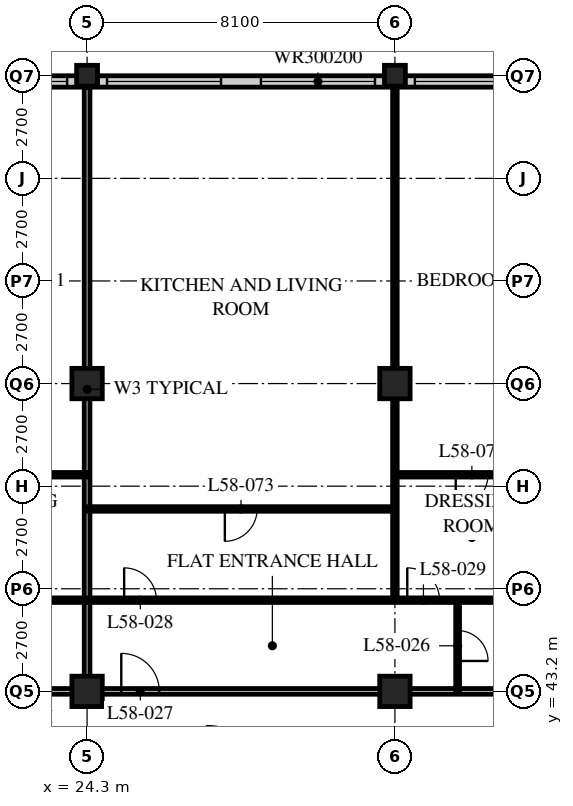
"""IFC4 building model, lengths in metres.
Left out: names, types, materials, properties, quantities, classifications, styles, units other than length and angle.
Written with IfcOpenShell. Run it as: python <this file> out.ifc"""

import sys

from ifc_helpers import new_model, si_unit, direction, frame, frame_2d, origin, origin_2d, place, context, subcontext, project, spatial, rectangle, hollow_rectangle, extrude, element, fill, save


model = new_model("IFC4")
c1 = context("Model", 3, precision=1e-05, world=origin(), true_north=direction((0.0, 1.0)))
c2 = subcontext(c1, "Body", "Model", "MODEL_VIEW")
j1 = project(units=[si_unit("LENGTHUNIT", "METRE"), si_unit("PLANEANGLEUNIT", "RADIAN")], contexts=[c1])
p1 = place(None, origin())
s1 = spatial("IfcSite", under=j1, at=p1, CompositionType="ELEMENT")
p2 = place(p1, origin())
s2 = spatial("IfcBuilding", under=s1, at=p2, CompositionType="ELEMENT")
p3 = place(p2, frame((0.0, 0.0, 224.4)))
s3 = spatial("IfcBuildingStorey", under=s2, at=p3, CompositionType="ELEMENT", Elevation=224.4)
for number, where, z_axis, x_axis in (
    (1, (24.3, 43.2, 0.0), (0.0, 0.0, 1.0), (1.0, 0.0, 0.0)),
    (2, (24.3, 51.3, 0.0), (0.0, 0.0, 1.0), (1.0, 0.0, 0.0)),
):
    element("IfcColumn", number, at=place(p3, frame(where, z_axis=z_axis, x_axis=x_axis)), inside=s3, PredefinedType="COLUMN", context=c2, shape_type="SweptSolid", body=[
        extrude(hollow_rectangle(XDim=0.8, YDim=0.8, WallThickness=0.08, at=origin_2d()), origin(), (0.0, 0.0, 1.0), 3.6),
    ])
p4 = place(p3, frame((24.3, 59.4, 0.0), z_axis=(0.0, 0.0, 1.0), x_axis=(1.0, 0.0, 0.0)))
e3 = element("IfcColumn", 3, at=p4, inside=s3, PredefinedType="COLUMN", context=c2, shape_type="SweptSolid", body=[
    extrude(hollow_rectangle(XDim=0.55, YDim=0.55, WallThickness=0.045, at=origin_2d()), origin(), (0.0, 0.0, 1.0), 3.6),
])
for number, where, z_axis, x_axis in (
    (4, (32.4, 43.2, 0.0), (0.0, 0.0, 1.0), (1.0, 0.0, 0.0)),
    (5, (32.4, 51.3, 0.0), (0.0, 0.0, 1.0), (1.0, 0.0, 0.0)),
):
    element("IfcColumn", number, at=place(p3, frame(where, z_axis=z_axis, x_axis=x_axis)), inside=s3, PredefinedType="COLUMN", context=c2, shape_type="SweptSolid", body=[
        extrude(hollow_rectangle(XDim=0.8, YDim=0.8, WallThickness=0.08, at=origin_2d()), origin(), (0.0, 0.0, 1.0), 3.6),
    ])
p5 = place(p3, frame((32.4, 59.4, 0.0), z_axis=(0.0, 0.0, 1.0), x_axis=(1.0, 0.0, 0.0)))
e6 = element("IfcColumn", 6, at=p5, inside=s3, PredefinedType="COLUMN", context=c2, shape_type="SweptSolid", body=[
    extrude(hollow_rectangle(XDim=0.55, YDim=0.55, WallThickness=0.045, at=origin_2d()), origin(), (0.0, 0.0, 1.0), 3.6),
])
p6 = place(p3, frame((48.3, 59.25, 0.0), z_axis=(0.0, 0.0, 1.0), x_axis=(-1.0, 0.0, 0.0)))
e7 = element("IfcWall", 7, at=p6, inside=s3, PredefinedType="SOLIDWALL", context=c2, shape_type="SweptSolid", body=[
    extrude(rectangle(XDim=40.2, YDim=0.3, at=frame_2d((20.1, 0.0))), origin(), (0.0, 0.0, 1.0), 3.39),
])
p7 = place(p6, frame((0.225, 0.0, 0.6)))
e8 = element("IfcOpeningElement", 8, at=p7, cuts=e7, PredefinedType="OPENING", context=c2, shape_type="SweptSolid", body=[
    extrude(rectangle(XDim=3.0, YDim=2.0, at=frame_2d((1.5, 1.0))), frame((0.0, 0.16, 0.0), z_axis=(0.0, -1.0, 0.0), x_axis=(1.0, 0.0, 0.0)), (0.0, 0.0, 1.0), 0.32),
])
p8 = place(p6, frame((4.275, 0.0, 0.6)))
e9 = element("IfcOpeningElement", 9, at=p8, cuts=e7, PredefinedType="OPENING", context=c2, shape_type="SweptSolid", body=[
    extrude(rectangle(XDim=3.0, YDim=2.0, at=frame_2d((1.5, 1.0))), frame((0.0, 0.16, 0.0), z_axis=(0.0, -1.0, 0.0), x_axis=(1.0, 0.0, 0.0)), (0.0, 0.0, 1.0), 0.32),
])
p9 = place(p6, frame((8.325, 0.0, 0.6)))
e10 = element("IfcOpeningElement", 10, at=p9, cuts=e7, PredefinedType="OPENING", context=c2, shape_type="SweptSolid", body=[
    extrude(rectangle(XDim=3.0, YDim=2.0, at=frame_2d((1.5, 1.0))), frame((0.0, 0.16, 0.0), z_axis=(0.0, -1.0, 0.0), x_axis=(1.0, 0.0, 0.0)), (0.0, 0.0, 1.0), 0.32),
])
p10 = place(p6, frame((12.375, 0.0, 0.6)))
e11 = element("IfcOpeningElement", 11, at=p10, cuts=e7, PredefinedType="OPENING", context=c2, shape_type="SweptSolid", body=[
    extrude(rectangle(XDim=3.0, YDim=2.0, at=frame_2d((1.5, 1.0))), frame((0.0, 0.16, 0.0), z_axis=(0.0, -1.0, 0.0), x_axis=(1.0, 0.0, 0.0)), (0.0, 0.0, 1.0), 0.32),
])
p11 = place(p6, frame((16.425, 0.0, 0.6)))
e12 = element("IfcOpeningElement", 12, at=p11, cuts=e7, PredefinedType="OPENING", context=c2, shape_type="SweptSolid", body=[
    extrude(rectangle(XDim=3.0, YDim=2.0, at=frame_2d((1.5, 1.0))), frame((0.0, 0.16, 0.0), z_axis=(0.0, -1.0, 0.0), x_axis=(1.0, 0.0, 0.0)), (0.0, 0.0, 1.0), 0.32),
])
p12 = place(p6, frame((20.475, 0.0, 0.6)))
e13 = element("IfcOpeningElement", 13, at=p12, cuts=e7, PredefinedType="OPENING", context=c2, shape_type="SweptSolid", body=[
    extrude(rectangle(XDim=3.0, YDim=2.0, at=frame_2d((1.5, 1.0))), frame((0.0, 0.16, 0.0), z_axis=(0.0, -1.0, 0.0), x_axis=(1.0, 0.0, 0.0)), (0.0, 0.0, 1.0), 0.32),
])
p13 = place(p6, frame((24.525, 0.0, 0.6)))
e14 = element("IfcOpeningElement", 14, at=p13, cuts=e7, PredefinedType="OPENING", context=c2, shape_type="SweptSolid", body=[
    extrude(rectangle(XDim=3.0, YDim=2.0, at=frame_2d((1.5, 1.0))), frame((0.0, 0.16, 0.0), z_axis=(0.0, -1.0, 0.0), x_axis=(1.0, 0.0, 0.0)), (0.0, 0.0, 1.0), 0.32),
])
p14 = place(p6, frame((28.575, 0.0, 0.6)))
e15 = element("IfcOpeningElement", 15, at=p14, cuts=e7, PredefinedType="OPENING", context=c2, shape_type="SweptSolid", body=[
    extrude(rectangle(XDim=3.0, YDim=2.0, at=frame_2d((1.5, 1.0))), frame((0.0, 0.16, 0.0), z_axis=(0.0, -1.0, 0.0), x_axis=(1.0, 0.0, 0.0)), (0.0, 0.0, 1.0), 0.32),
])
p15 = place(p6, frame((32.625, 0.0, 0.6)))
e16 = element("IfcOpeningElement", 16, at=p15, cuts=e7, PredefinedType="OPENING", context=c2, shape_type="SweptSolid", body=[
    extrude(rectangle(XDim=3.0, YDim=2.0, at=frame_2d((1.5, 1.0))), frame((0.0, 0.16, 0.0), z_axis=(0.0, -1.0, 0.0), x_axis=(1.0, 0.0, 0.0)), (0.0, 0.0, 1.0), 0.32),
])
p16 = place(p6, frame((36.675, 0.0, 0.6)))
e17 = element("IfcOpeningElement", 17, at=p16, cuts=e7, PredefinedType="OPENING", context=c2, shape_type="SweptSolid", body=[
    extrude(rectangle(XDim=3.0, YDim=2.0, at=frame_2d((1.5, 1.0))), frame((0.0, 0.16, 0.0), z_axis=(0.0, -1.0, 0.0), x_axis=(1.0, 0.0, 0.0)), (0.0, 0.0, 1.0), 0.32),
])
p17 = place(p3, frame((8.1, 43.2, 0.0), z_axis=(0.0, 0.0, 1.0), x_axis=(1.0, 0.0, 0.0)))
e18 = element("IfcWall", 18, at=p17, inside=s3, PredefinedType="PARTITIONING", context=c2, shape_type="SweptSolid", body=[
    extrude(rectangle(XDim=36.45, YDim=0.15, at=frame_2d((18.225, 0.0))), origin(), (0.0, 0.0, 1.0), 2.628),
])
p18 = place(p17, frame((4.45, 0.0, 0.0)))
e19 = element("IfcOpeningElement", 19, at=p18, cuts=e18, PredefinedType="OPENING", context=c2, shape_type="SweptSolid", body=[
    extrude(rectangle(XDim=1.0, YDim=2.1, at=frame_2d((0.5, 1.05))), frame((0.0, 0.085, 0.0), z_axis=(0.0, -1.0, 0.0), x_axis=(1.0, 0.0, 0.0)), (0.0, 0.0, 1.0), 0.17),
])
p19 = place(p17, frame((17.1, 0.0, 0.0)))
e20 = element("IfcOpeningElement", 20, at=p19, cuts=e18, PredefinedType="OPENING", context=c2, shape_type="SweptSolid", body=[
    extrude(rectangle(XDim=1.0, YDim=2.1, at=frame_2d((0.5, 1.05))), frame((0.0, 0.085, 0.0), z_axis=(0.0, -1.0, 0.0), x_axis=(1.0, 0.0, 0.0)), (0.0, 0.0, 1.0), 0.17),
])
p20 = place(p17, frame((29.05, 0.0, 0.0)))
e21 = element("IfcOpeningElement", 21, at=p20, cuts=e18, PredefinedType="OPENING", context=c2, shape_type="SweptSolid", body=[
    extrude(rectangle(XDim=1.0, YDim=2.1, at=frame_2d((0.5, 1.05))), frame((0.0, 0.085, 0.0), z_axis=(0.0, -1.0, 0.0), x_axis=(1.0, 0.0, 0.0)), (0.0, 0.0, 1.0), 0.17),
])
p21 = place(p17, frame((33.925, 0.0, 0.0)))
e22 = element("IfcOpeningElement", 22, at=p21, cuts=e18, PredefinedType="OPENING", context=c2, shape_type="SweptSolid", body=[
    extrude(rectangle(XDim=1.0, YDim=2.1, at=frame_2d((0.5, 1.05))), frame((0.0, 0.085, 0.0), z_axis=(0.0, -1.0, 0.0), x_axis=(1.0, 0.0, 0.0)), (0.0, 0.0, 1.0), 0.17),
])
p22 = place(p17, frame((1.525, 0.0, 0.0)))
e23 = element("IfcOpeningElement", 23, at=p22, cuts=e18, PredefinedType="OPENING", context=c2, shape_type="SweptSolid", body=[
    extrude(rectangle(XDim=1.0, YDim=2.1, at=frame_2d((0.5, 1.05))), frame((0.0, 0.085, 0.0), z_axis=(0.0, -1.0, 0.0), x_axis=(1.0, 0.0, 0.0)), (0.0, 0.0, 1.0), 0.17),
])
p23 = place(p3, frame((24.3, 43.2, 0.0), z_axis=(0.0, 0.0, 1.0), x_axis=(0.0, 1.0, 0.0)))
e24 = element("IfcWall", 24, at=p23, inside=s3, PredefinedType="PARTITIONING", context=c2, shape_type="SweptSolid", body=[
    extrude(rectangle(XDim=15.9, YDim=0.15, at=frame_2d((7.95, 0.0))), origin(), (0.0, 0.0, 1.0), 2.628),
])
p24 = place(p3, frame((34.05, 43.2, 0.0), z_axis=(0.0, 0.0, 1.0), x_axis=(0.0, 1.0, 0.0)))
e25 = element("IfcWall", 25, at=p24, inside=s3, PredefinedType="PARTITIONING", context=c2, shape_type="SweptSolid", body=[
    extrude(rectangle(XDim=2.4, YDim=0.1, at=frame_2d((1.2, 0.0))), origin(), (0.0, 0.0, 1.0), 3.39),
])
p25 = place(p24, frame((0.8, 0.0, 0.0)))
e26 = element("IfcOpeningElement", 26, at=p25, cuts=e25, PredefinedType="OPENING", context=c2, shape_type="SweptSolid", body=[
    extrude(rectangle(XDim=0.8, YDim=2.1, at=frame_2d((0.4, 1.05))), frame((0.0, 0.06, 0.0), z_axis=(0.0, -1.0, 0.0), x_axis=(1.0, 0.0, 0.0)), (0.0, 0.0, 1.0), 0.12),
])
p26 = place(p3, frame((32.4, 45.6, 0.0), z_axis=(0.0, 0.0, 1.0), x_axis=(0.0, 1.0, 0.0)))
e27 = element("IfcWall", 27, at=p26, inside=s3, PredefinedType="PARTITIONING", context=c2, shape_type="SweptSolid", body=[
    extrude(rectangle(XDim=13.5, YDim=0.12, at=frame_2d((6.75, 0.0))), origin(), (0.0, 0.0, 1.0), 2.628),
])
p27 = place(p3, frame((4.1, 45.6, 0.0), z_axis=(0.0, 0.0, 1.0), x_axis=(1.0, 0.0, 0.0)))
e28 = element("IfcWall", 28, at=p27, inside=s3, PredefinedType="PARTITIONING", context=c2, shape_type="SweptSolid", body=[
    extrude(rectangle(XDim=32.35, YDim=0.12, at=frame_2d((16.175, 0.0))), origin(), (0.0, 0.0, 1.0), 3.39),
])
p28 = place(p27, frame((9.025, 0.0, 0.0)))
e29 = element("IfcOpeningElement", 29, at=p28, cuts=e28, PredefinedType="OPENING", context=c2, shape_type="SweptSolid", body=[
    extrude(rectangle(XDim=0.85, YDim=2.1, at=frame_2d((0.425, 1.05))), frame((0.0, 0.07, 0.0), z_axis=(0.0, -1.0, 0.0), x_axis=(1.0, 0.0, 0.0)), (0.0, 0.0, 1.0), 0.14),
])
p29 = place(p27, frame((16.475, 0.0, 0.0)))
e30 = element("IfcOpeningElement", 30, at=p29, cuts=e28, PredefinedType="OPENING", context=c2, shape_type="SweptSolid", body=[
    extrude(rectangle(XDim=0.85, YDim=2.1, at=frame_2d((0.425, 1.05))), frame((0.0, 0.07, 0.0), z_axis=(0.0, -1.0, 0.0), x_axis=(1.0, 0.0, 0.0)), (0.0, 0.0, 1.0), 0.14),
])
p30 = place(p27, frame((21.175, 0.0, 0.0)))
e31 = element("IfcOpeningElement", 31, at=p30, cuts=e28, PredefinedType="OPENING", context=c2, shape_type="SweptSolid", body=[
    extrude(rectangle(XDim=0.85, YDim=2.1, at=frame_2d((0.425, 1.05))), frame((0.0, 0.07, 0.0), z_axis=(0.0, -1.0, 0.0), x_axis=(1.0, 0.0, 0.0)), (0.0, 0.0, 1.0), 0.14),
])
p31 = place(p27, frame((28.625, 0.0, 0.0)))
e32 = element("IfcOpeningElement", 32, at=p31, cuts=e28, PredefinedType="OPENING", context=c2, shape_type="SweptSolid", body=[
    extrude(rectangle(XDim=0.85, YDim=2.1, at=frame_2d((0.425, 1.05))), frame((0.0, 0.07, 0.0), z_axis=(0.0, -1.0, 0.0), x_axis=(1.0, 0.0, 0.0)), (0.0, 0.0, 1.0), 0.14),
])
p32 = place(p27, frame((6.725, 0.0, 0.0)))
e33 = element("IfcOpeningElement", 33, at=p32, cuts=e28, PredefinedType="OPENING", context=c2, shape_type="SweptSolid", body=[
    extrude(rectangle(XDim=0.85, YDim=2.1, at=frame_2d((0.425, 1.05))), frame((0.0, 0.07, 0.0), z_axis=(0.0, -1.0, 0.0), x_axis=(1.0, 0.0, 0.0)), (0.0, 0.0, 1.0), 0.14),
])
p33 = place(p27, frame((2.875, 0.0, 0.0)))
e34 = element("IfcOpeningElement", 34, at=p33, cuts=e28, PredefinedType="OPENING", context=c2, shape_type="SweptSolid", body=[
    extrude(rectangle(XDim=0.85, YDim=2.1, at=frame_2d((0.425, 1.05))), frame((0.0, 0.07, 0.0), z_axis=(0.0, -1.0, 0.0), x_axis=(1.0, 0.0, 0.0)), (0.0, 0.0, 1.0), 0.14),
])
p34 = place(p3, frame((20.25, 48.9, 0.0), z_axis=(0.0, 0.0, 1.0), x_axis=(1.0, 0.0, 0.0)))
e35 = element("IfcWall", 35, at=p34, inside=s3, PredefinedType="PARTITIONING", context=c2, shape_type="SweptSolid", body=[
    extrude(rectangle(XDim=4.05, YDim=0.12, at=frame_2d((2.025, 0.0))), origin(), (0.0, 0.0, 1.0), 3.39),
])
p35 = place(p34, frame((1.6, 0.0, 0.0)))
e36 = element("IfcOpeningElement", 36, at=p35, cuts=e35, PredefinedType="OPENING", context=c2, shape_type="SweptSolid", body=[
    extrude(rectangle(XDim=0.85, YDim=2.1, at=frame_2d((0.425, 1.05))), frame((0.0, 0.07, 0.0), z_axis=(0.0, -1.0, 0.0), x_axis=(1.0, 0.0, 0.0)), (0.0, 0.0, 1.0), 0.14),
])
p36 = place(p3, frame((24.3, 48.0, 0.0), z_axis=(0.0, 0.0, 1.0), x_axis=(1.0, 0.0, 0.0)))
e37 = element("IfcWall", 37, at=p36, inside=s3, PredefinedType="PARTITIONING", context=c2, shape_type="SweptSolid", body=[
    extrude(rectangle(XDim=8.1, YDim=0.12, at=frame_2d((4.05, 0.0))), origin(), (0.0, 0.0, 1.0), 3.39),
])
p37 = place(p36, frame((3.625, 0.0, 0.0)))
e38 = element("IfcOpeningElement", 38, at=p37, cuts=e37, PredefinedType="OPENING", context=c2, shape_type="SweptSolid", body=[
    extrude(rectangle(XDim=0.85, YDim=2.1, at=frame_2d((0.425, 1.05))), frame((0.0, 0.07, 0.0), z_axis=(0.0, -1.0, 0.0), x_axis=(1.0, 0.0, 0.0)), (0.0, 0.0, 1.0), 0.14),
])
p38 = place(p3, frame((32.4, 48.9, 0.0), z_axis=(0.0, 0.0, 1.0), x_axis=(1.0, 0.0, 0.0)))
e39 = element("IfcWall", 39, at=p38, inside=s3, PredefinedType="PARTITIONING", context=c2, shape_type="SweptSolid", body=[
    extrude(rectangle(XDim=4.05, YDim=0.12, at=frame_2d((2.025, 0.0))), origin(), (0.0, 0.0, 1.0), 3.39),
])
p39 = place(p38, frame((1.6, 0.0, 0.0)))
e40 = element("IfcOpeningElement", 40, at=p39, cuts=e39, PredefinedType="OPENING", context=c2, shape_type="SweptSolid", body=[
    extrude(rectangle(XDim=0.85, YDim=2.1, at=frame_2d((0.425, 1.05))), frame((0.0, 0.07, 0.0), z_axis=(0.0, -1.0, 0.0), x_axis=(1.0, 0.0, 0.0)), (0.0, 0.0, 1.0), 0.14),
])
p40 = place(p10, origin())
e41 = element("IfcWindow", 41, at=p40, inside=s3, PartitioningType="SINGLE_PANEL", PredefinedType="WINDOW", context=c2, shape_type="SweptSolid", body=[
    extrude(rectangle(XDim=3.0, YDim=2.0, at=frame_2d((1.5, 1.0))), frame((0.0, 0.03, 0.0), z_axis=(0.0, -1.0, 0.0), x_axis=(1.0, 0.0, 0.0)), (0.0, 0.0, 1.0), 0.06),
])
fill(e11, e41)
p41 = place(p11, origin())
e42 = element("IfcWindow", 42, at=p41, inside=s3, PartitioningType="SINGLE_PANEL", PredefinedType="WINDOW", context=c2, shape_type="SweptSolid", body=[
    extrude(rectangle(XDim=3.0, YDim=2.0, at=frame_2d((1.5, 1.0))), frame((0.0, 0.03, 0.0), z_axis=(0.0, -1.0, 0.0), x_axis=(1.0, 0.0, 0.0)), (0.0, 0.0, 1.0), 0.06),
])
fill(e12, e42)
p42 = place(p12, origin())
e43 = element("IfcWindow", 43, at=p42, inside=s3, PartitioningType="SINGLE_PANEL", PredefinedType="WINDOW", context=c2, shape_type="SweptSolid", body=[
    extrude(rectangle(XDim=3.0, YDim=2.0, at=frame_2d((1.5, 1.0))), frame((0.0, 0.03, 0.0), z_axis=(0.0, -1.0, 0.0), x_axis=(1.0, 0.0, 0.0)), (0.0, 0.0, 1.0), 0.06),
])
fill(e13, e43)
p43 = place(p13, origin())
e44 = element("IfcWindow", 44, at=p43, inside=s3, PartitioningType="SINGLE_PANEL", PredefinedType="WINDOW", context=c2, shape_type="SweptSolid", body=[
    extrude(rectangle(XDim=3.0, YDim=2.0, at=frame_2d((1.5, 1.0))), frame((0.0, 0.03, 0.0), z_axis=(0.0, -1.0, 0.0), x_axis=(1.0, 0.0, 0.0)), (0.0, 0.0, 1.0), 0.06),
])
fill(e14, e44)
p44 = place(p25, origin())
e45 = element("IfcDoor", 45, at=p44, inside=s3, OperationType="SINGLE_SWING_RIGHT", PredefinedType="DOOR", context=c2, shape_type="SweptSolid", body=[
    extrude(rectangle(XDim=0.8, YDim=2.1, at=frame_2d((0.4, 1.05))), frame((0.0, 0.025, 0.0), z_axis=(0.0, -1.0, 0.0), x_axis=(1.0, 0.0, 0.0)), (0.0, 0.0, 1.0), 0.05),
])
fill(e26, e45)
p45 = place(p19, origin())
e46 = element("IfcDoor", 46, at=p45, inside=s3, OperationType="SINGLE_SWING_LEFT", PredefinedType="DOOR", context=c2, shape_type="SweptSolid", body=[
    extrude(rectangle(XDim=1.0, YDim=2.1, at=frame_2d((0.5, 1.05))), frame((0.0, 0.025, 0.0), z_axis=(0.0, -1.0, 0.0), x_axis=(1.0, 0.0, 0.0)), (0.0, 0.0, 1.0), 0.05),
])
fill(e20, e46)
p46 = place(p30, origin())
e47 = element("IfcDoor", 47, at=p46, inside=s3, OperationType="SINGLE_SWING_LEFT", PredefinedType="DOOR", context=c2, shape_type="SweptSolid", body=[
    extrude(rectangle(XDim=0.85, YDim=2.1, at=frame_2d((0.425, 1.05))), frame((0.0, 0.025, 0.0), z_axis=(0.0, -1.0, 0.0), x_axis=(1.0, 0.0, 0.0)), (0.0, 0.0, 1.0), 0.05),
])
fill(e31, e47)
p47 = place(p31, origin())
e48 = element("IfcDoor", 48, at=p47, inside=s3, OperationType="SINGLE_SWING_LEFT", PredefinedType="DOOR", context=c2, shape_type="SweptSolid", body=[
    extrude(rectangle(XDim=0.85, YDim=2.1, at=frame_2d((0.425, 1.05))), frame((0.0, 0.025, 0.0), z_axis=(0.0, -1.0, 0.0), x_axis=(1.0, 0.0, 0.0)), (0.0, 0.0, 1.0), 0.05),
])
fill(e32, e48)
p48 = place(p37, origin())
e49 = element("IfcDoor", 49, at=p48, inside=s3, OperationType="SINGLE_SWING_RIGHT", PredefinedType="DOOR", context=c2, shape_type="SweptSolid", body=[
    extrude(rectangle(XDim=0.85, YDim=2.1, at=frame_2d((0.425, 1.05))), frame((0.0, 0.025, 0.0), z_axis=(0.0, -1.0, 0.0), x_axis=(1.0, 0.0, 0.0)), (0.0, 0.0, 1.0), 0.05),
])
fill(e38, e49)
p49 = place(p39, origin())
e50 = element("IfcDoor", 50, at=p49, inside=s3, OperationType="SINGLE_SWING_RIGHT", PredefinedType="DOOR", context=c2, shape_type="SweptSolid", body=[
    extrude(rectangle(XDim=0.85, YDim=2.1, at=frame_2d((0.425, 1.05))), frame((0.0, 0.025, 0.0), z_axis=(0.0, -1.0, 0.0), x_axis=(1.0, 0.0, 0.0)), (0.0, 0.0, 1.0), 0.05),
])
fill(e40, e50)
save(model, sys.argv[1])
